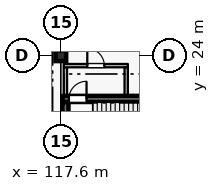
"""IFC4 building model, lengths in metres.
Left out: names, types, materials, properties, quantities, classifications, styles, units other than length and angle.
Written with IfcOpenShell. Run it as: python <this file> out.ifc"""

import sys

from ifc_helpers import new_model, si_unit, direction, frame, frame_2d, origin, origin_2d, place, context, subcontext, project, spatial, rectangle, extrude, element, fill, save


model = new_model("IFC4")
c1 = context("Model", 3, precision=1e-05, world=origin(), true_north=direction((0.0, 1.0)))
c2 = subcontext(c1, "Body", "Model", "MODEL_VIEW")
j1 = project(units=[si_unit("LENGTHUNIT", "METRE"), si_unit("PLANEANGLEUNIT", "RADIAN")], contexts=[c1])
p1 = place(None, origin())
s1 = spatial("IfcSite", under=j1, at=p1, CompositionType="ELEMENT")
p2 = place(p1, origin())
s2 = spatial("IfcBuilding", under=s1, at=p2, CompositionType="ELEMENT")
p3 = place(p2, frame((0.0, 0.0, 11.4)))
s3 = spatial("IfcBuildingStorey", under=s2, at=p3, CompositionType="ELEMENT", Elevation=11.4)
p4 = place(p3, frame((117.6, 24.0, 0.0), z_axis=(0.0, 0.0, 1.0), x_axis=(1.0, 0.0, 0.0)))
e1 = element("IfcColumn", 1, at=p4, inside=s3, PredefinedType="COLUMN", context=c2, shape_type="SweptSolid", body=[
    extrude(rectangle(XDim=0.7, YDim=0.7, at=origin_2d()), origin(), (0.0, 0.0, 1.0), 4.8),
])
p5 = place(p3, frame((117.7, 21.16, 0.0), z_axis=(0.0, 0.0, 1.0), x_axis=(1.0, 0.0, 0.0)))
e2 = element("IfcWall", 2, at=p5, inside=s3, PredefinedType="SHEAR", context=c2, shape_type="SweptSolid", body=[
    extrude(rectangle(XDim=8.2, YDim=0.4, at=frame_2d((4.1, 0.0))), origin(), (0.0, 0.0, 1.0), 4.535),
])
p6 = place(p5, frame((0.43, 0.0, 0.0)))
e3 = element("IfcOpeningElement", 3, at=p6, cuts=e2, PredefinedType="OPENING", context=c2, shape_type="SweptSolid", body=[
    extrude(rectangle(XDim=1.16, YDim=2.2, at=frame_2d((0.58, 1.1))), frame((0.0, 0.21, 0.0), z_axis=(0.0, -1.0, 0.0), x_axis=(1.0, 0.0, 0.0)), (0.0, 0.0, 1.0), 0.42),
])
p7 = place(p3, frame((117.9, 17.005, 0.0), z_axis=(0.0, 0.0, 1.0), x_axis=(0.0, 1.0, 0.0)))
e4 = element("IfcWall", 4, at=p7, inside=s3, PredefinedType="SHEAR", context=c2, shape_type="SweptSolid", body=[
    extrude(rectangle(XDim=3.95, YDim=0.4, at=frame_2d((1.975, 0.0))), origin(), (0.0, 0.0, 1.0), 4.535),
])
p8 = place(p3, frame((117.9, 21.365, 0.0), z_axis=(0.0, 0.0, 1.0), x_axis=(0.0, 1.0, 0.0)))
e5 = element("IfcWall", 5, at=p8, inside=s3, PredefinedType="PARTITIONING", context=c2, shape_type="SweptSolid", body=[
    extrude(rectangle(XDim=1.87, YDim=0.22, at=frame_2d((0.935, 0.0))), origin(), (0.0, 0.0, 1.0), 4.535),
])
p9 = place(p3, frame((117.79, 23.35, 0.0), z_axis=(0.0, 0.0, 1.0), x_axis=(1.0, 0.0, 0.0)))
e6 = element("IfcWall", 6, at=p9, inside=s3, PredefinedType="PARTITIONING", context=c2, shape_type="SweptSolid", body=[
    extrude(rectangle(XDim=4.22, YDim=0.22, at=frame_2d((2.11, 0.0))), origin(), (0.0, 0.0, 1.0), 4.535),
])
p10 = place(p9, frame((1.55, 0.0, 0.0)))
e7 = element("IfcOpeningElement", 7, at=p10, cuts=e6, PredefinedType="OPENING", context=c2, shape_type="SweptSolid", body=[
    extrude(rectangle(XDim=1.12, YDim=2.2, at=frame_2d((0.56, 1.1))), frame((0.0, 0.12, 0.0), z_axis=(0.0, -1.0, 0.0), x_axis=(1.0, 0.0, 0.0)), (0.0, 0.0, 1.0), 0.24),
])
p11 = place(p3, frame((121.9, 21.365, 0.0), z_axis=(0.0, 0.0, 1.0), x_axis=(0.0, 1.0, 0.0)))
e8 = element("IfcWall", 8, at=p11, inside=s3, PredefinedType="PARTITIONING", context=c2, shape_type="SweptSolid", body=[
    extrude(rectangle(XDim=1.87, YDim=0.22, at=frame_2d((0.935, 0.0))), origin(), (0.0, 0.0, 1.0), 4.535),
])
p12 = place(p6, origin())
e9 = element("IfcDoor", 9, at=p12, inside=s3, OperationType="SINGLE_SWING_RIGHT", PredefinedType="DOOR", context=c2, shape_type="SweptSolid", body=[
    extrude(rectangle(XDim=1.16, YDim=2.2, at=frame_2d((0.58, 1.1))), frame((0.0, 0.025, 0.0), z_axis=(0.0, -1.0, 0.0), x_axis=(1.0, 0.0, 0.0)), (0.0, 0.0, 1.0), 0.05),
])
fill(e3, e9)
p13 = place(p10, origin())
e10 = element("IfcDoor", 10, at=p13, inside=s3, OperationType="SINGLE_SWING_LEFT", PredefinedType="DOOR", context=c2, shape_type="SweptSolid", body=[
    extrude(rectangle(XDim=1.12, YDim=2.2, at=frame_2d((0.56, 1.1))), frame((0.0, 0.025, 0.0), z_axis=(0.0, -1.0, 0.0), x_axis=(1.0, 0.0, 0.0)), (0.0, 0.0, 1.0), 0.05),
])
fill(e7, e10)
save(model, sys.argv[1])
